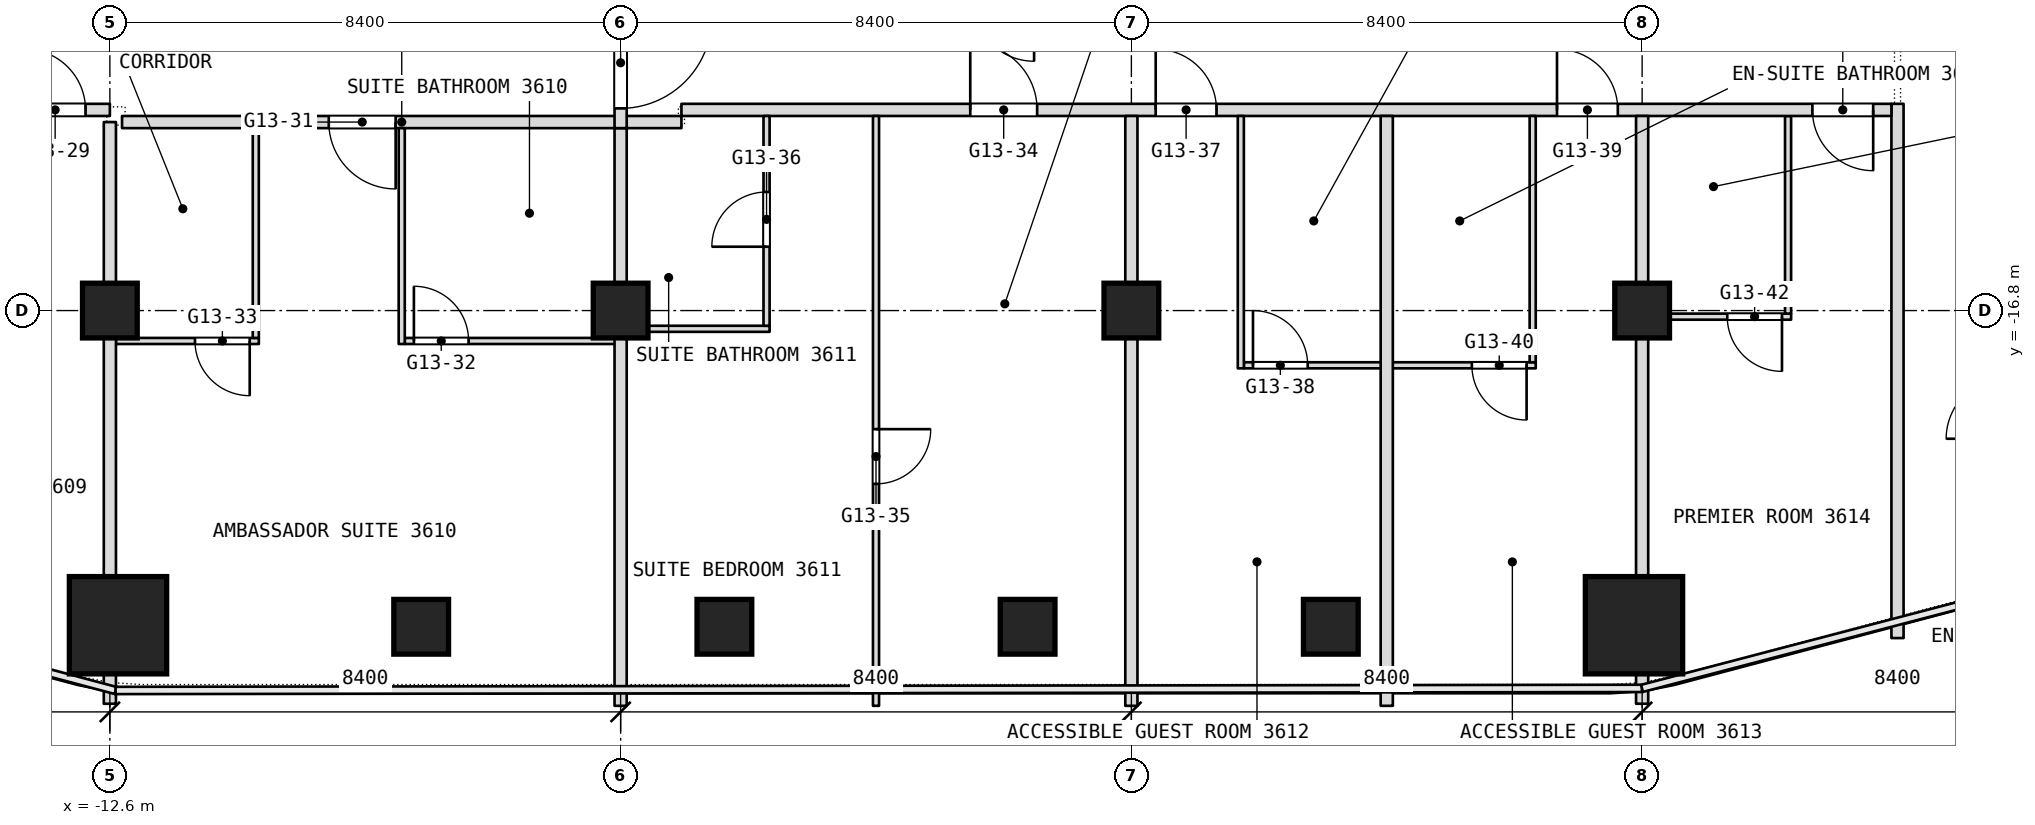
"""IFC4 building model, lengths in metres.
Left out: names, types, materials, properties, quantities, classifications, styles, units other than length and angle.
Written with IfcOpenShell. Run it as: python <this file> out.ifc"""

import sys

from ifc_helpers import new_model, si_unit, direction, frame, frame_2d, origin, origin_2d, place, context, subcontext, project, spatial, rectangle, extrude, element, fill, save


model = new_model("IFC4")
c1 = context("Model", 3, precision=1e-05, world=origin(), true_north=direction((0.0, 1.0)))
c2 = subcontext(c1, "Body", "Model", "MODEL_VIEW")
j1 = project(units=[si_unit("LENGTHUNIT", "METRE"), si_unit("PLANEANGLEUNIT", "RADIAN")], contexts=[c1])
p1 = place(None, origin())
s1 = spatial("IfcSite", under=j1, at=p1, CompositionType="ELEMENT")
p2 = place(p1, origin())
s2 = spatial("IfcBuilding", under=s1, at=p2, CompositionType="ELEMENT")
p3 = place(p2, frame((0.0, 0.0, 155.3)))
s3 = spatial("IfcBuildingStorey", under=s2, at=p3, CompositionType="ELEMENT", Elevation=155.3)
for number, where, z_axis, x_axis in (
    (1, (-12.466, -21.975, 0.0), (0.0, 0.0, 1.0), (1.0, 0.0, 0.0)),
    (2, (12.466, -21.975, 0.0), (0.0, 0.0, 1.0), (1.0, 0.0, 0.0)),
):
    element("IfcColumn", number, at=place(p3, frame(where, z_axis=z_axis, x_axis=x_axis)), inside=s3, PredefinedType="COLUMN", context=c2, shape_type="SweptSolid", body=[
        extrude(rectangle(XDim=1.6, YDim=1.6, at=origin_2d()), origin(), (0.0, 0.0, 1.0), 3.6),
    ])
for number, where, z_axis, x_axis in (
    (3, (-12.6, -16.8, 0.0), (0.0, 0.0, 1.0), (1.0, 0.0, 0.0)),
    (4, (-4.2, -16.8, 0.0), (0.0, 0.0, 1.0), (1.0, 0.0, 0.0)),
    (5, (4.2, -16.8, 0.0), (0.0, 0.0, 1.0), (1.0, 0.0, 0.0)),
    (6, (12.6, -16.8, 0.0), (0.0, 0.0, 1.0), (1.0, 0.0, 0.0)),
    (7, (7.48, -22.0, 0.0), (0.0, 0.0, 1.0), (1.0, 0.0, 0.0)),
    (8, (2.493, -22.0, 0.0), (0.0, 0.0, 1.0), (1.0, 0.0, 0.0)),
    (9, (-2.493, -22.0, 0.0), (0.0, 0.0, 1.0), (1.0, 0.0, 0.0)),
    (10, (-7.48, -22.0, 0.0), (0.0, 0.0, 1.0), (1.0, 0.0, 0.0)),
):
    element("IfcColumn", number, at=place(p3, frame(where, z_axis=z_axis, x_axis=x_axis)), inside=s3, PredefinedType="COLUMN", context=c2, shape_type="SweptSolid", body=[
        extrude(rectangle(XDim=0.9, YDim=0.9, at=origin_2d()), origin(), (0.0, 0.0, 1.0), 3.6),
    ])
p4 = place(p3, frame((6.05, -17.7, 0.0), z_axis=(0.0, 0.0, 1.0), x_axis=(1.0, 0.0, 0.0)))
e11 = element("IfcWall", 11, at=p4, inside=s3, PredefinedType="PARTITIONING", context=c2, shape_type="SweptSolid", body=[
    extrude(rectangle(XDim=4.8, YDim=0.1, at=frame_2d((2.4, 0.0))), origin(), (0.0, 0.0, 1.0), 3.34),
])
p5 = place(p4, frame((0.15, 0.0, 0.0)))
e12 = element("IfcOpeningElement", 12, at=p5, cuts=e11, PredefinedType="OPENING", context=c2, shape_type="SweptSolid", body=[
    extrude(rectangle(XDim=0.9, YDim=2.1, at=frame_2d((0.45, 1.05))), frame((0.0, 0.05, 0.0), z_axis=(0.0, -1.0, 0.0), x_axis=(1.0, 0.0, 0.0)), (0.0, 0.0, 1.0), 0.1),
])
p6 = place(p4, frame((3.75, 0.0, 0.0)))
e13 = element("IfcOpeningElement", 13, at=p6, cuts=e11, PredefinedType="OPENING", context=c2, shape_type="SweptSolid", body=[
    extrude(rectangle(XDim=0.9, YDim=2.1, at=frame_2d((0.45, 1.05))), frame((0.0, 0.05, 0.0), z_axis=(0.0, -1.0, 0.0), x_axis=(1.0, 0.0, 0.0)), (0.0, 0.0, 1.0), 0.1),
])
p7 = place(p3, frame((-12.5, -17.3, 0.0), z_axis=(0.0, 0.0, 1.0), x_axis=(1.0, 0.0, 0.0)))
e14 = element("IfcWall", 14, at=p7, inside=s3, PredefinedType="PARTITIONING", context=c2, shape_type="SweptSolid", body=[
    extrude(rectangle(XDim=2.35, YDim=0.1, at=frame_2d((1.175, 0.0))), origin(), (0.0, 0.0, 1.0), 3.34),
])
p8 = place(p7, frame((1.3, 0.0, 0.0)))
e15 = element("IfcOpeningElement", 15, at=p8, cuts=e14, PredefinedType="OPENING", context=c2, shape_type="SweptSolid", body=[
    extrude(rectangle(XDim=0.9, YDim=2.1, at=frame_2d((0.45, 1.05))), frame((0.0, 0.05, 0.0), z_axis=(0.0, -1.0, 0.0), x_axis=(1.0, 0.0, 0.0)), (0.0, 0.0, 1.0), 0.1),
])
p9 = place(p3, frame((-7.75, -17.3, 0.0), z_axis=(0.0, 0.0, 1.0), x_axis=(1.0, 0.0, 0.0)))
e16 = element("IfcWall", 16, at=p9, inside=s3, PredefinedType="PARTITIONING", context=c2, shape_type="SweptSolid", body=[
    extrude(rectangle(XDim=3.65, YDim=0.1, at=frame_2d((1.825, 0.0))), origin(), (0.0, 0.0, 1.0), 3.34),
])
p10 = place(p9, frame((0.15, 0.0, 0.0)))
e17 = element("IfcOpeningElement", 17, at=p10, cuts=e16, PredefinedType="OPENING", context=c2, shape_type="SweptSolid", body=[
    extrude(rectangle(XDim=0.9, YDim=2.1, at=frame_2d((0.45, 1.05))), frame((0.0, 0.05, 0.0), z_axis=(0.0, -1.0, 0.0), x_axis=(1.0, 0.0, 0.0)), (0.0, 0.0, 1.0), 0.1),
])
p11 = place(p3, frame((-4.1, -17.1, 0.0), z_axis=(0.0, 0.0, 1.0), x_axis=(1.0, 0.0, 0.0)))
e18 = element("IfcWall", 18, at=p11, inside=s3, PredefinedType="PARTITIONING", context=c2, shape_type="SweptSolid", body=[
    extrude(rectangle(XDim=2.35, YDim=0.1, at=frame_2d((1.175, 0.0))), origin(), (0.0, 0.0, 1.0), 3.34),
])
p12 = place(p3, frame((12.7, -16.9, 0.0), z_axis=(0.0, 0.0, 1.0), x_axis=(1.0, 0.0, 0.0)))
e19 = element("IfcWall", 19, at=p12, inside=s3, PredefinedType="PARTITIONING", context=c2, shape_type="SweptSolid", body=[
    extrude(rectangle(XDim=2.35, YDim=0.1, at=frame_2d((1.175, 0.0))), origin(), (0.0, 0.0, 1.0), 2.89),
])
p13 = place(p12, frame((1.3, 0.0, 0.0)))
e20 = element("IfcOpeningElement", 20, at=p13, cuts=e19, PredefinedType="OPENING", context=c2, shape_type="SweptSolid", body=[
    extrude(rectangle(XDim=0.9, YDim=2.1, at=frame_2d((0.45, 1.05))), frame((0.0, 0.05, 0.0), z_axis=(0.0, -1.0, 0.0), x_axis=(1.0, 0.0, 0.0)), (0.0, 0.0, 1.0), 0.1),
])
p14 = place(p3, frame((16.8, -22.186, 0.0), z_axis=(0.0, 0.0, 1.0), x_axis=(0.0, 1.0, 0.0)))
e21 = element("IfcWall", 21, at=p14, inside=s3, PredefinedType="PARTITIONING", context=c2, shape_type="SweptSolid", body=[
    extrude(rectangle(XDim=8.786, YDim=0.2, at=frame_2d((4.393, 0.0))), origin(), (0.0, 0.0, 1.0), 3.34),
])
p15 = place(p3, frame((15.0, -16.85, 0.0), z_axis=(0.0, 0.0, 1.0), x_axis=(0.0, 1.0, 0.0)))
e22 = element("IfcWall", 22, at=p15, inside=s3, PredefinedType="PARTITIONING", context=c2, shape_type="SweptSolid", body=[
    extrude(rectangle(XDim=3.25, YDim=0.1, at=frame_2d((1.625, 0.0))), origin(), (0.0, 0.0, 1.0), 3.34),
])
p16 = place(p3, frame((-12.4, -13.7, 0.0), z_axis=(0.0, 0.0, 1.0), x_axis=(1.0, 0.0, 0.0)))
e23 = element("IfcWall", 23, at=p16, inside=s3, PredefinedType="PARTITIONING", context=c2, shape_type="SweptSolid", body=[
    extrude(rectangle(XDim=9.2, YDim=0.2, at=frame_2d((4.6, 0.0))), origin(), (0.0, 0.0, 1.0), 3.34),
])
p17 = place(p16, frame((3.4, 0.0, 0.0)))
e24 = element("IfcOpeningElement", 24, at=p17, cuts=e23, PredefinedType="OPENING", context=c2, shape_type="SweptSolid", body=[
    extrude(rectangle(XDim=1.1, YDim=2.1, at=frame_2d((0.55, 1.05))), frame((0.0, 0.1, 0.0), z_axis=(0.0, -1.0, 0.0), x_axis=(1.0, 0.0, 0.0)), (0.0, 0.0, 1.0), 0.2),
])
p18 = place(p3, frame((-16.7, -13.5, 0.0), z_axis=(0.0, 0.0, 1.0), x_axis=(1.0, 0.0, 0.0)))
e25 = element("IfcWall", 25, at=p18, inside=s3, PredefinedType="PARTITIONING", context=c2, shape_type="SweptSolid", body=[
    extrude(rectangle(XDim=4.1, YDim=0.2, at=frame_2d((2.05, 0.0))), origin(), (0.0, 0.0, 1.0), 3.34),
])
p19 = place(p18, frame((2.7, 0.0, 0.0)))
e26 = element("IfcOpeningElement", 26, at=p19, cuts=e25, PredefinedType="OPENING", context=c2, shape_type="SweptSolid", body=[
    extrude(rectangle(XDim=1.0, YDim=2.1, at=frame_2d((0.5, 1.05))), frame((0.0, 0.1, 0.0), z_axis=(0.0, -1.0, 0.0), x_axis=(1.0, 0.0, 0.0)), (0.0, 0.0, 1.0), 0.2),
])
p20 = place(p3, frame((-3.2, -13.5, 0.0), z_axis=(0.0, 0.0, 1.0), x_axis=(1.0, 0.0, 0.0)))
e27 = element("IfcWall", 27, at=p20, inside=s3, PredefinedType="PARTITIONING", context=c2, shape_type="SweptSolid", body=[
    extrude(rectangle(XDim=19.9, YDim=0.2, at=frame_2d((9.95, 0.0))), origin(), (0.0, 0.0, 1.0), 3.34),
])
p21 = place(p20, frame((4.75, 0.0, 0.0)))
e28 = element("IfcOpeningElement", 28, at=p21, cuts=e27, PredefinedType="OPENING", context=c2, shape_type="SweptSolid", body=[
    extrude(rectangle(XDim=1.1, YDim=2.1, at=frame_2d((0.55, 1.05))), frame((0.0, 0.1, 0.0), z_axis=(0.0, -1.0, 0.0), x_axis=(1.0, 0.0, 0.0)), (0.0, 0.0, 1.0), 0.2),
])
p22 = place(p20, frame((7.8, 0.0, 0.0)))
e29 = element("IfcOpeningElement", 29, at=p22, cuts=e27, PredefinedType="OPENING", context=c2, shape_type="SweptSolid", body=[
    extrude(rectangle(XDim=1.0, YDim=2.1, at=frame_2d((0.5, 1.05))), frame((0.0, 0.1, 0.0), z_axis=(0.0, -1.0, 0.0), x_axis=(1.0, 0.0, 0.0)), (0.0, 0.0, 1.0), 0.2),
])
p23 = place(p20, frame((14.4, 0.0, 0.0)))
e30 = element("IfcOpeningElement", 30, at=p23, cuts=e27, PredefinedType="OPENING", context=c2, shape_type="SweptSolid", body=[
    extrude(rectangle(XDim=1.0, YDim=2.1, at=frame_2d((0.5, 1.05))), frame((0.0, 0.1, 0.0), z_axis=(0.0, -1.0, 0.0), x_axis=(1.0, 0.0, 0.0)), (0.0, 0.0, 1.0), 0.2),
])
p24 = place(p20, frame((18.6, 0.0, 0.0)))
e31 = element("IfcOpeningElement", 31, at=p24, cuts=e27, PredefinedType="OPENING", context=c2, shape_type="SweptSolid", body=[
    extrude(rectangle(XDim=1.0, YDim=2.1, at=frame_2d((0.5, 1.05))), frame((0.0, 0.1, 0.0), z_axis=(0.0, -1.0, 0.0), x_axis=(1.0, 0.0, 0.0)), (0.0, 0.0, 1.0), 0.2),
])
p25 = place(p3, frame((12.6, -23.266, 0.0), z_axis=(0.0, 0.0, 1.0), x_axis=(0.0, 1.0, 0.0)))
e32 = element("IfcWall", 32, at=p25, inside=s3, PredefinedType="PARTITIONING", context=c2, shape_type="SweptSolid", body=[
    extrude(rectangle(XDim=0.491, YDim=0.2, at=frame_2d((0.246, 0.0))), origin(), (0.0, 0.0, 1.0), 3.34),
])
p26 = place(p3, frame((12.6, -21.175, 0.0), z_axis=(0.0, 0.0, 1.0), x_axis=(0.0, 1.0, 0.0)))
e33 = element("IfcWall", 33, at=p26, inside=s3, PredefinedType="PARTITIONING", context=c2, shape_type="SweptSolid", body=[
    extrude(rectangle(XDim=7.575, YDim=0.2, at=frame_2d((3.788, 0.0))), origin(), (0.0, 0.0, 1.0), 3.34),
])
p27 = place(p3, frame((10.8, -17.65, 0.0), z_axis=(0.0, 0.0, 1.0), x_axis=(0.0, 1.0, 0.0)))
e34 = element("IfcWall", 34, at=p27, inside=s3, PredefinedType="PARTITIONING", context=c2, shape_type="SweptSolid", body=[
    extrude(rectangle(XDim=4.05, YDim=0.1, at=frame_2d((2.025, 0.0))), origin(), (0.0, 0.0, 1.0), 3.34),
])
p28 = place(p3, frame((8.4, -23.3, 0.0), z_axis=(0.0, 0.0, 1.0), x_axis=(0.0, 1.0, 0.0)))
e35 = element("IfcWall", 35, at=p28, inside=s3, PredefinedType="PARTITIONING", context=c2, shape_type="SweptSolid", body=[
    extrude(rectangle(XDim=9.7, YDim=0.2, at=frame_2d((4.85, 0.0))), origin(), (0.0, 0.0, 1.0), 3.34),
])
p29 = place(p3, frame((6.0, -17.75, 0.0), z_axis=(0.0, 0.0, 1.0), x_axis=(0.0, 1.0, 0.0)))
e36 = element("IfcWall", 36, at=p29, inside=s3, PredefinedType="PARTITIONING", context=c2, shape_type="SweptSolid", body=[
    extrude(rectangle(XDim=4.15, YDim=0.1, at=frame_2d((2.075, 0.0))), origin(), (0.0, 0.0, 1.0), 3.34),
])
p30 = place(p3, frame((4.2, -23.3, 0.0), z_axis=(0.0, 0.0, 1.0), x_axis=(0.0, 1.0, 0.0)))
e37 = element("IfcWall", 37, at=p30, inside=s3, PredefinedType="PARTITIONING", context=c2, shape_type="SweptSolid", body=[
    extrude(rectangle(XDim=9.7, YDim=0.2, at=frame_2d((4.85, 0.0))), origin(), (0.0, 0.0, 1.0), 3.34),
])
p31 = place(p3, frame((0.0, -23.3, 0.0), z_axis=(0.0, 0.0, 1.0), x_axis=(0.0, 1.0, 0.0)))
e38 = element("IfcWall", 38, at=p31, inside=s3, PredefinedType="PARTITIONING", context=c2, shape_type="SweptSolid", body=[
    extrude(rectangle(XDim=9.7, YDim=0.1, at=frame_2d((4.85, 0.0))), origin(), (0.0, 0.0, 1.0), 3.34),
])
p32 = place(p31, frame((3.65, 0.0, 0.0)))
e39 = element("IfcOpeningElement", 39, at=p32, cuts=e38, PredefinedType="OPENING", context=c2, shape_type="SweptSolid", body=[
    extrude(rectangle(XDim=0.9, YDim=2.1, at=frame_2d((0.45, 1.05))), frame((0.0, 0.05, 0.0), z_axis=(0.0, -1.0, 0.0), x_axis=(1.0, 0.0, 0.0)), (0.0, 0.0, 1.0), 0.1),
])
p33 = place(p3, frame((-1.8, -17.05, 0.0), z_axis=(0.0, 0.0, 1.0), x_axis=(0.0, 1.0, 0.0)))
e40 = element("IfcWall", 40, at=p33, inside=s3, PredefinedType="PARTITIONING", context=c2, shape_type="SweptSolid", body=[
    extrude(rectangle(XDim=3.45, YDim=0.1, at=frame_2d((1.725, 0.0))), origin(), (0.0, 0.0, 1.0), 3.34),
])
p34 = place(p33, frame((1.3, 0.0, 0.0)))
e41 = element("IfcOpeningElement", 41, at=p34, cuts=e40, PredefinedType="OPENING", context=c2, shape_type="SweptSolid", body=[
    extrude(rectangle(XDim=0.9, YDim=2.1, at=frame_2d((0.45, 1.05))), frame((0.0, 0.05, 0.0), z_axis=(0.0, -1.0, 0.0), x_axis=(1.0, 0.0, 0.0)), (0.0, 0.0, 1.0), 0.1),
])
p35 = place(p3, frame((-4.2, -23.3, 0.0), z_axis=(0.0, 0.0, 1.0), x_axis=(0.0, 1.0, 0.0)))
e42 = element("IfcWall", 42, at=p35, inside=s3, PredefinedType="PARTITIONING", context=c2, shape_type="SweptSolid", body=[
    extrude(rectangle(XDim=9.5, YDim=0.2, at=frame_2d((4.75, 0.0))), origin(), (0.0, 0.0, 1.0), 3.34),
])
p36 = place(p3, frame((-4.2, -13.8, 0.0), z_axis=(0.0, 0.0, 1.0), x_axis=(0.0, 1.0, 0.0)))
e43 = element("IfcWall", 43, at=p36, inside=s3, PredefinedType="PARTITIONING", context=c2, shape_type="SweptSolid", body=[
    extrude(rectangle(XDim=13.8, YDim=0.2, at=frame_2d((6.9, 0.0))), origin(), (0.0, 0.0, 1.0), 3.34),
])
p37 = place(p36, frame((12.15, 0.0, 0.0)))
e44 = element("IfcOpeningElement", 44, at=p37, cuts=e43, PredefinedType="OPENING", context=c2, shape_type="SweptSolid", body=[
    extrude(rectangle(XDim=1.5, YDim=2.1, at=frame_2d((0.75, 1.05))), frame((0.0, 0.1, 0.0), z_axis=(0.0, -1.0, 0.0), x_axis=(1.0, 0.0, 0.0)), (0.0, 0.0, 1.0), 0.2),
])
p38 = place(p36, frame((0.325, 0.0, 0.0)))
e45 = element("IfcOpeningElement", 45, at=p38, cuts=e43, PredefinedType="OPENING", context=c2, shape_type="SweptSolid", body=[
    extrude(rectangle(XDim=1.5, YDim=2.1, at=frame_2d((0.75, 1.05))), frame((0.0, 0.1, 0.0), z_axis=(0.0, -1.0, 0.0), x_axis=(1.0, 0.0, 0.0)), (0.0, 0.0, 1.0), 0.2),
])
p39 = place(p3, frame((-7.8, -17.35, 0.0), z_axis=(0.0, 0.0, 1.0), x_axis=(0.0, 1.0, 0.0)))
e46 = element("IfcWall", 46, at=p39, inside=s3, PredefinedType="PARTITIONING", context=c2, shape_type="SweptSolid", body=[
    extrude(rectangle(XDim=3.55, YDim=0.1, at=frame_2d((1.775, 0.0))), origin(), (0.0, 0.0, 1.0), 3.34),
])
p40 = place(p3, frame((-10.2, -17.25, 0.0), z_axis=(0.0, 0.0, 1.0), x_axis=(0.0, 1.0, 0.0)))
e47 = element("IfcWall", 47, at=p40, inside=s3, PredefinedType="PARTITIONING", context=c2, shape_type="SweptSolid", body=[
    extrude(rectangle(XDim=3.45, YDim=0.1, at=frame_2d((1.725, 0.0))), origin(), (0.0, 0.0, 1.0), 3.34),
])
p41 = place(p3, frame((-12.6, -23.266, 0.0), z_axis=(0.0, 0.0, 1.0), x_axis=(0.0, 1.0, 0.0)))
e48 = element("IfcWall", 48, at=p41, inside=s3, PredefinedType="PARTITIONING", context=c2, shape_type="SweptSolid", body=[
    extrude(rectangle(XDim=0.491, YDim=0.2, at=frame_2d((0.246, 0.0))), origin(), (0.0, 0.0, 1.0), 3.34),
])
p42 = place(p3, frame((-12.6, -21.175, 0.0), z_axis=(0.0, 0.0, 1.0), x_axis=(0.0, 1.0, 0.0)))
e49 = element("IfcWall", 49, at=p42, inside=s3, PredefinedType="PARTITIONING", context=c2, shape_type="SweptSolid", body=[
    extrude(rectangle(XDim=7.475, YDim=0.2, at=frame_2d((3.738, 0.0))), origin(), (0.0, 0.0, 1.0), 3.34),
])
p43 = place(p5, origin())
e50 = element("IfcDoor", 50, at=p43, inside=s3, OperationType="SINGLE_SWING_LEFT", PredefinedType="DOOR", context=c2, shape_type="SweptSolid", body=[
    extrude(rectangle(XDim=0.9, YDim=2.1, at=frame_2d((0.45, 1.05))), frame((0.0, 0.025, 0.0), z_axis=(0.0, -1.0, 0.0), x_axis=(1.0, 0.0, 0.0)), (0.0, 0.0, 1.0), 0.05),
])
fill(e12, e50)
p44 = place(p6, origin())
e51 = element("IfcDoor", 51, at=p44, inside=s3, OperationType="SINGLE_SWING_RIGHT", PredefinedType="DOOR", context=c2, shape_type="SweptSolid", body=[
    extrude(rectangle(XDim=0.9, YDim=2.1, at=frame_2d((0.45, 1.05))), frame((0.0, 0.025, 0.0), z_axis=(0.0, -1.0, 0.0), x_axis=(1.0, 0.0, 0.0)), (0.0, 0.0, 1.0), 0.05),
])
fill(e13, e51)
p45 = place(p8, origin())
e52 = element("IfcDoor", 52, at=p45, inside=s3, OperationType="SINGLE_SWING_RIGHT", PredefinedType="DOOR", context=c2, shape_type="SweptSolid", body=[
    extrude(rectangle(XDim=0.9, YDim=2.1, at=frame_2d((0.45, 1.05))), frame((0.0, 0.025, 0.0), z_axis=(0.0, -1.0, 0.0), x_axis=(1.0, 0.0, 0.0)), (0.0, 0.0, 1.0), 0.05),
])
fill(e15, e52)
p46 = place(p10, origin())
e53 = element("IfcDoor", 53, at=p46, inside=s3, OperationType="SINGLE_SWING_LEFT", PredefinedType="DOOR", context=c2, shape_type="SweptSolid", body=[
    extrude(rectangle(XDim=0.9, YDim=2.1, at=frame_2d((0.45, 1.05))), frame((0.0, 0.025, 0.0), z_axis=(0.0, -1.0, 0.0), x_axis=(1.0, 0.0, 0.0)), (0.0, 0.0, 1.0), 0.05),
])
fill(e17, e53)
p47 = place(p13, origin())
e54 = element("IfcDoor", 54, at=p47, inside=s3, OperationType="SINGLE_SWING_RIGHT", PredefinedType="DOOR", context=c2, shape_type="SweptSolid", body=[
    extrude(rectangle(XDim=0.9, YDim=2.1, at=frame_2d((0.45, 1.05))), frame((0.0, 0.025, 0.0), z_axis=(0.0, -1.0, 0.0), x_axis=(1.0, 0.0, 0.0)), (0.0, 0.0, 1.0), 0.05),
])
fill(e20, e54)
p48 = place(p17, origin())
e55 = element("IfcDoor", 55, at=p48, inside=s3, OperationType="SINGLE_SWING_LEFT", PredefinedType="DOOR", context=c2, shape_type="SweptSolid", body=[
    extrude(rectangle(XDim=1.1, YDim=2.1, at=frame_2d((0.55, 1.05))), frame((0.0, 0.025, 0.0), z_axis=(0.0, -1.0, 0.0), x_axis=(1.0, 0.0, 0.0)), (0.0, 0.0, 1.0), 0.05),
])
fill(e24, e55)
p49 = place(p19, origin())
e56 = element("IfcDoor", 56, at=p49, inside=s3, OperationType="SINGLE_SWING_LEFT", PredefinedType="DOOR", context=c2, shape_type="SweptSolid", body=[
    extrude(rectangle(XDim=1.0, YDim=2.1, at=frame_2d((0.5, 1.05))), frame((0.0, 0.025, 0.0), z_axis=(0.0, -1.0, 0.0), x_axis=(1.0, 0.0, 0.0)), (0.0, 0.0, 1.0), 0.05),
])
fill(e26, e56)
p50 = place(p21, origin())
e57 = element("IfcDoor", 57, at=p50, inside=s3, OperationType="SINGLE_SWING_RIGHT", PredefinedType="DOOR", context=c2, shape_type="SweptSolid", body=[
    extrude(rectangle(XDim=1.1, YDim=2.1, at=frame_2d((0.55, 1.05))), frame((0.0, 0.025, 0.0), z_axis=(0.0, -1.0, 0.0), x_axis=(1.0, 0.0, 0.0)), (0.0, 0.0, 1.0), 0.05),
])
fill(e28, e57)
p51 = place(p22, origin())
e58 = element("IfcDoor", 58, at=p51, inside=s3, OperationType="SINGLE_SWING_LEFT", PredefinedType="DOOR", context=c2, shape_type="SweptSolid", body=[
    extrude(rectangle(XDim=1.0, YDim=2.1, at=frame_2d((0.5, 1.05))), frame((0.0, 0.025, 0.0), z_axis=(0.0, -1.0, 0.0), x_axis=(1.0, 0.0, 0.0)), (0.0, 0.0, 1.0), 0.05),
])
fill(e29, e58)
p52 = place(p23, origin())
e59 = element("IfcDoor", 59, at=p52, inside=s3, OperationType="SINGLE_SWING_LEFT", PredefinedType="DOOR", context=c2, shape_type="SweptSolid", body=[
    extrude(rectangle(XDim=1.0, YDim=2.1, at=frame_2d((0.5, 1.05))), frame((0.0, 0.025, 0.0), z_axis=(0.0, -1.0, 0.0), x_axis=(1.0, 0.0, 0.0)), (0.0, 0.0, 1.0), 0.05),
])
fill(e30, e59)
p53 = place(p24, origin())
e60 = element("IfcDoor", 60, at=p53, inside=s3, OperationType="SINGLE_SWING_LEFT", PredefinedType="DOOR", context=c2, shape_type="SweptSolid", body=[
    extrude(rectangle(XDim=1.0, YDim=2.1, at=frame_2d((0.5, 1.05))), frame((0.0, 0.025, 0.0), z_axis=(0.0, -1.0, 0.0), x_axis=(1.0, 0.0, 0.0)), (0.0, 0.0, 1.0), 0.05),
])
fill(e31, e60)
p54 = place(p32, origin())
e61 = element("IfcDoor", 61, at=p54, inside=s3, OperationType="SINGLE_SWING_RIGHT", PredefinedType="DOOR", context=c2, shape_type="SweptSolid", body=[
    extrude(rectangle(XDim=0.9, YDim=2.1, at=frame_2d((0.45, 1.05))), frame((0.0, 0.025, 0.0), z_axis=(0.0, -1.0, 0.0), x_axis=(1.0, 0.0, 0.0)), (0.0, 0.0, 1.0), 0.05),
])
fill(e39, e61)
p55 = place(p34, origin())
e62 = element("IfcDoor", 62, at=p55, inside=s3, OperationType="SINGLE_SWING_LEFT", PredefinedType="DOOR", context=c2, shape_type="SweptSolid", body=[
    extrude(rectangle(XDim=0.9, YDim=2.1, at=frame_2d((0.45, 1.05))), frame((0.0, 0.025, 0.0), z_axis=(0.0, -1.0, 0.0), x_axis=(1.0, 0.0, 0.0)), (0.0, 0.0, 1.0), 0.05),
])
fill(e41, e62)
p56 = place(p38, origin())
e63 = element("IfcDoor", 63, at=p56, inside=s3, OperationType="DOUBLE_DOOR_DOUBLE_SWING", PredefinedType="DOOR", context=c2, shape_type="SweptSolid", body=[
    extrude(rectangle(XDim=1.5, YDim=2.1, at=frame_2d((0.75, 1.05))), frame((0.0, 0.025, 0.0), z_axis=(0.0, -1.0, 0.0), x_axis=(1.0, 0.0, 0.0)), (0.0, 0.0, 1.0), 0.05),
])
fill(e45, e63)
save(model, sys.argv[1])
